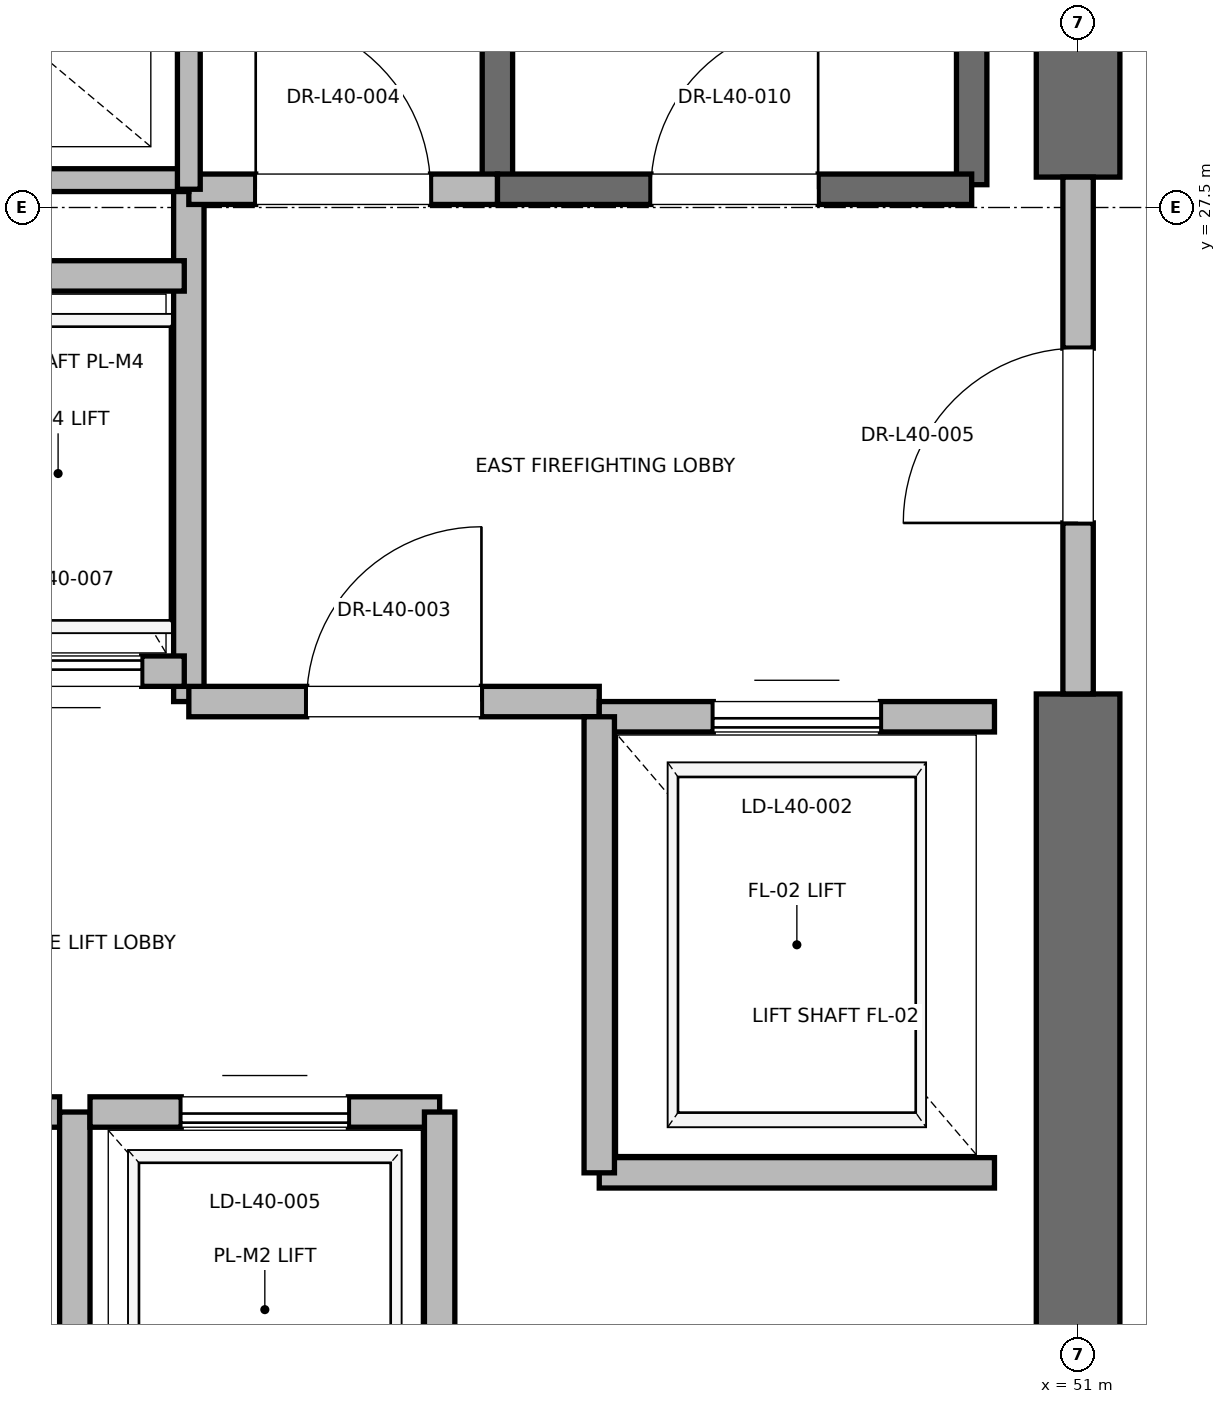
"""IFC4 building model, lengths in metres.
Left out: names, types, materials, properties, quantities, classifications, styles, units other than length and angle.
Written with IfcOpenShell. Run it as: python <this file> out.ifc"""

import sys

from ifc_helpers import new_model, si_unit, direction, frame, frame_2d, origin, place, context, subcontext, project, spatial, rectangle, extrude, element, fill, save


model = new_model("IFC4")
c1 = context("Model", 3, precision=1e-05, world=origin(), true_north=direction((0.0, 1.0)))
c2 = subcontext(c1, "Body", "Model", "MODEL_VIEW")
j1 = project(units=[si_unit("LENGTHUNIT", "METRE"), si_unit("PLANEANGLEUNIT", "RADIAN")], contexts=[c1])
p1 = place(None, origin())
s1 = spatial("IfcSite", under=j1, at=p1, CompositionType="ELEMENT")
p2 = place(p1, origin())
s2 = spatial("IfcBuilding", under=s1, at=p2, CompositionType="ELEMENT")
p3 = place(p2, frame((0.0, 0.0, 172.4)))
s3 = spatial("IfcBuildingStorey", under=s2, at=p3, CompositionType="ELEMENT", Elevation=172.4)
p4 = place(p3, frame((51.0, 18.5, 0.0), z_axis=(0.0, 0.0, 1.0), x_axis=(0.0, 1.0, 0.0)))
e1 = element("IfcWall", 1, at=p4, inside=s3, PredefinedType="SHEAR", context=c2, shape_type="SweptSolid", body=[
    extrude(rectangle(XDim=5.8, YDim=0.55, at=frame_2d((2.9, 0.0))), origin(), (0.0, 0.0, 1.0), 3.775),
])
p5 = place(p3, frame((51.0, 27.7, 0.0), z_axis=(0.0, 0.0, 1.0), x_axis=(0.0, 1.0, 0.0)))
e2 = element("IfcWall", 2, at=p5, inside=s3, PredefinedType="SHEAR", context=c2, shape_type="SweptSolid", body=[
    extrude(rectangle(XDim=8.8, YDim=0.55, at=frame_2d((4.4, 0.0))), origin(), (0.0, 0.0, 1.0), 3.775),
])
p6 = place(p3, frame((50.3, 27.65, 0.0), z_axis=(0.0, 0.0, 1.0), x_axis=(0.0, 1.0, 0.0)))
e3 = element("IfcWall", 3, at=p6, inside=s3, PredefinedType="SOLIDWALL", context=c2, shape_type="SweptSolid", body=[
    extrude(rectangle(XDim=8.15, YDim=0.2, at=frame_2d((4.075, 0.0))), origin(), (0.0, 0.0, 1.0), 3.775),
])
p7 = place(p3, frame((47.18, 27.62, 0.0), z_axis=(0.0, 0.0, 1.0), x_axis=(0.0, 1.0, 0.0)))
e4 = element("IfcWall", 4, at=p7, inside=s3, PredefinedType="SOLIDWALL", context=c2, shape_type="SweptSolid", body=[
    extrude(rectangle(XDim=8.18, YDim=0.2, at=frame_2d((4.09, 0.0))), origin(), (0.0, 0.0, 1.0), 3.775),
])
p8 = place(p3, frame((47.18, 27.62, 0.0), z_axis=(0.0, 0.0, 1.0), x_axis=(1.0, 0.0, 0.0)))
e5 = element("IfcWall", 5, at=p8, inside=s3, PredefinedType="SOLIDWALL", context=c2, shape_type="SweptSolid", body=[
    extrude(rectangle(XDim=3.12, YDim=0.2, at=frame_2d((1.56, 0.0))), origin(), (0.0, 0.0, 1.0), 3.775),
])
p9 = place(p8, frame((1.01, 0.0, 0.0)))
e6 = element("IfcOpeningElement", 6, at=p9, cuts=e5, PredefinedType="OPENING", context=c2, shape_type="SweptSolid", body=[
    extrude(rectangle(XDim=1.1, YDim=2.15, at=frame_2d((0.55, 1.075))), frame((0.0, 0.1, 0.0), z_axis=(0.0, -1.0, 0.0), x_axis=(1.0, 0.0, 0.0)), (0.0, 0.0, 1.0), 0.2),
])
p10 = place(p3, frame((45.15, 24.25, 0.0), z_axis=(0.0, 0.0, 1.0), x_axis=(0.0, 1.0, 0.0)))
e7 = element("IfcWall", 7, at=p10, inside=s3, PredefinedType="PARTITIONING", context=c2, shape_type="SweptSolid", body=[
    extrude(rectangle(XDim=3.37, YDim=0.2, at=frame_2d((1.685, 0.0))), origin(), (0.0, 0.0, 1.0), 3.775),
])
p11 = place(p3, frame((45.15, 24.25, 0.0), z_axis=(0.0, 0.0, 1.0), x_axis=(1.0, 0.0, 0.0)))
e8 = element("IfcWall", 8, at=p11, inside=s3, PredefinedType="PARTITIONING", context=c2, shape_type="SweptSolid", body=[
    extrude(rectangle(XDim=2.7, YDim=0.2, at=frame_2d((1.35, 0.0))), origin(), (0.0, 0.0, 1.0), 3.775),
])
p12 = place(p11, frame((0.775, 0.0, 0.0)))
e9 = element("IfcOpeningElement", 9, at=p12, cuts=e8, PredefinedType="OPENING", context=c2, shape_type="SweptSolid", body=[
    extrude(rectangle(XDim=1.15, YDim=2.2, at=frame_2d((0.575, 1.1))), frame((0.0, 0.1, 0.0), z_axis=(0.0, -1.0, 0.0), x_axis=(1.0, 0.0, 0.0)), (0.0, 0.0, 1.0), 0.2),
])
p13 = place(p3, frame((45.15, 27.62, 0.0), z_axis=(0.0, 0.0, 1.0), x_axis=(1.0, 0.0, 0.0)))
e10 = element("IfcWall", 10, at=p13, inside=s3, PredefinedType="PARTITIONING", context=c2, shape_type="SweptSolid", body=[
    extrude(rectangle(XDim=2.03, YDim=0.2, at=frame_2d((1.015, 0.0))), origin(), (0.0, 0.0, 1.0), 3.775),
])
p14 = place(p13, frame((0.44, 0.0, 0.0)))
e11 = element("IfcOpeningElement", 11, at=p14, cuts=e10, PredefinedType="OPENING", context=c2, shape_type="SweptSolid", body=[
    extrude(rectangle(XDim=1.15, YDim=2.2, at=frame_2d((0.575, 1.1))), frame((0.0, 0.1, 0.0), z_axis=(0.0, -1.0, 0.0), x_axis=(1.0, 0.0, 0.0)), (0.0, 0.0, 1.0), 0.2),
])
p15 = place(p3, frame((51.0, 24.3, 0.0), z_axis=(0.0, 0.0, 1.0), x_axis=(0.0, 1.0, 0.0)))
e12 = element("IfcWall", 12, at=p15, inside=s3, PredefinedType="PARTITIONING", context=c2, shape_type="SweptSolid", body=[
    extrude(rectangle(XDim=3.4, YDim=0.2, at=frame_2d((1.7, 0.0))), origin(), (0.0, 0.0, 1.0), 2.755),
])
p16 = place(p15, frame((1.125, 0.0, 0.0)))
e13 = element("IfcOpeningElement", 13, at=p16, cuts=e12, PredefinedType="OPENING", context=c2, shape_type="SweptSolid", body=[
    extrude(rectangle(XDim=1.15, YDim=2.2, at=frame_2d((0.575, 1.1))), frame((0.0, 0.1, 0.0), z_axis=(0.0, -1.0, 0.0), x_axis=(1.0, 0.0, 0.0)), (0.0, 0.0, 1.0), 0.2),
])
p17 = place(p3, frame((47.85, 21.15, 0.0), z_axis=(0.0, 0.0, 1.0), x_axis=(1.0, 0.0, 0.0)))
e14 = element("IfcWall", 14, at=p17, inside=s3, PredefinedType="SOLIDWALL", context=c2, shape_type="SweptSolid", body=[
    extrude(rectangle(XDim=2.6, YDim=0.2, at=frame_2d((1.3, 0.0))), origin(), (0.0, 0.0, 1.0), 3.775),
])
p18 = place(p3, frame((50.45, 24.15, 0.0), z_axis=(0.0, 0.0, 1.0), x_axis=(-1.0, 0.0, 0.0)))
e15 = element("IfcWall", 15, at=p18, inside=s3, PredefinedType="SOLIDWALL", context=c2, shape_type="SweptSolid", body=[
    extrude(rectangle(XDim=2.6, YDim=0.2, at=frame_2d((1.3, 0.0))), origin(), (0.0, 0.0, 1.0), 2.755),
])
p19 = place(p18, frame((0.75, 0.0, 0.0)))
e16 = element("IfcOpeningElement", 16, at=p19, cuts=e15, PredefinedType="OPENING", context=c2, shape_type="SweptSolid", body=[
    extrude(rectangle(XDim=1.1, YDim=2.2, at=frame_2d((0.55, 1.1))), frame((0.0, 0.1, 0.0), z_axis=(0.0, -1.0, 0.0), x_axis=(1.0, 0.0, 0.0)), (0.0, 0.0, 1.0), 0.2),
])
p20 = place(p3, frame((47.85, 24.15, 0.0), z_axis=(0.0, 0.0, 1.0), x_axis=(0.0, -1.0, 0.0)))
e17 = element("IfcWall", 17, at=p20, inside=s3, PredefinedType="SOLIDWALL", context=c2, shape_type="SweptSolid", body=[
    extrude(rectangle(XDim=3.0, YDim=0.2, at=frame_2d((1.5, 0.0))), origin(), (0.0, 0.0, 1.0), 3.775),
])
p21 = place(p3, frame((44.3, 21.55, 0.0), z_axis=(0.0, 0.0, 1.0), x_axis=(-1.0, 0.0, 0.0)))
e18 = element("IfcWall", 18, at=p21, inside=s3, PredefinedType="SOLIDWALL", context=c2, shape_type="SweptSolid", body=[
    extrude(rectangle(XDim=2.3, YDim=0.2, at=frame_2d((1.15, 0.0))), origin(), (0.0, 0.0, 1.0), 3.775),
])
p22 = place(p21, frame((0.6, 0.0, 0.0)))
e19 = element("IfcOpeningElement", 19, at=p22, cuts=e18, PredefinedType="OPENING", context=c2, shape_type="SweptSolid", body=[
    extrude(rectangle(XDim=1.1, YDim=2.2, at=frame_2d((0.55, 1.1))), frame((0.0, 0.1, 0.0), z_axis=(0.0, -1.0, 0.0), x_axis=(1.0, 0.0, 0.0)), (0.0, 0.0, 1.0), 0.2),
])
p23 = place(p3, frame((44.4, 18.95, 0.0), z_axis=(0.0, 0.0, 1.0), x_axis=(0.0, 1.0, 0.0)))
e20 = element("IfcWall", 20, at=p23, inside=s3, PredefinedType="SOLIDWALL", context=c2, shape_type="SweptSolid", body=[
    extrude(rectangle(XDim=2.6, YDim=0.2, at=frame_2d((1.3, 0.0))), origin(), (0.0, 0.0, 1.0), 3.775),
])
p24 = place(p3, frame((46.8, 21.55, 0.0), z_axis=(0.0, 0.0, 1.0), x_axis=(-1.0, 0.0, 0.0)))
e21 = element("IfcWall", 21, at=p24, inside=s3, PredefinedType="SOLIDWALL", context=c2, shape_type="SweptSolid", body=[
    extrude(rectangle(XDim=2.3, YDim=0.2, at=frame_2d((1.15, 0.0))), origin(), (0.0, 0.0, 1.0), 3.775),
])
p25 = place(p24, frame((0.6, 0.0, 0.0)))
e22 = element("IfcOpeningElement", 22, at=p25, cuts=e21, PredefinedType="OPENING", context=c2, shape_type="SweptSolid", body=[
    extrude(rectangle(XDim=1.1, YDim=2.2, at=frame_2d((0.55, 1.1))), frame((0.0, 0.1, 0.0), z_axis=(0.0, -1.0, 0.0), x_axis=(1.0, 0.0, 0.0)), (0.0, 0.0, 1.0), 0.2),
])
p26 = place(p3, frame((46.8, 18.95, 0.0), z_axis=(0.0, 0.0, 1.0), x_axis=(0.0, 1.0, 0.0)))
e23 = element("IfcWall", 23, at=p26, inside=s3, PredefinedType="SOLIDWALL", context=c2, shape_type="SweptSolid", body=[
    extrude(rectangle(XDim=2.6, YDim=0.2, at=frame_2d((1.3, 0.0))), origin(), (0.0, 0.0, 1.0), 3.775),
])
p27 = place(p3, frame((43.46, 24.45, 0.0), z_axis=(0.0, 0.0, 1.0), x_axis=(1.0, 0.0, 0.0)))
e24 = element("IfcWall", 24, at=p27, inside=s3, PredefinedType="SOLIDWALL", context=c2, shape_type="SweptSolid", body=[
    extrude(rectangle(XDim=1.66, YDim=0.2, at=frame_2d((0.83, 0.0))), origin(), (0.0, 0.0, 1.0), 3.775),
])
p28 = place(p27, frame((0.28, 0.0, 0.0)))
e25 = element("IfcOpeningElement", 25, at=p28, cuts=e24, PredefinedType="OPENING", context=c2, shape_type="SweptSolid", body=[
    extrude(rectangle(XDim=1.1, YDim=2.2, at=frame_2d((0.55, 1.1))), frame((0.0, 0.1, 0.0), z_axis=(0.0, -1.0, 0.0), x_axis=(1.0, 0.0, 0.0)), (0.0, 0.0, 1.0), 0.2),
])
p29 = place(p3, frame((45.12, 27.05, 0.0), z_axis=(0.0, 0.0, 1.0), x_axis=(-1.0, 0.0, 0.0)))
e26 = element("IfcWall", 26, at=p29, inside=s3, PredefinedType="SOLIDWALL", context=c2, shape_type="SweptSolid", body=[
    extrude(rectangle(XDim=1.66, YDim=0.2, at=frame_2d((0.83, 0.0))), origin(), (0.0, 0.0, 1.0), 3.775),
])
p30 = place(p3, frame((41.56, 27.68, 0.0), z_axis=(0.0, 0.0, 1.0), x_axis=(1.0, 0.0, 0.0)))
e27 = element("IfcWall", 27, at=p30, inside=s3, PredefinedType="PARTITIONING", context=c2, shape_type="SweptSolid", body=[
    extrude(rectangle(XDim=3.59, YDim=0.15, at=frame_2d((1.795, 0.0))), origin(), (0.0, 0.0, 1.0), 2.85),
])
p31 = place(p3, frame((45.15, 27.62, 0.0), z_axis=(0.0, 0.0, 1.0), x_axis=(0.0, 1.0, 0.0)))
e28 = element("IfcWall", 28, at=p31, inside=s3, PredefinedType="PARTITIONING", context=c2, shape_type="SweptSolid", body=[
    extrude(rectangle(XDim=3.1, YDim=0.15, at=frame_2d((1.55, 0.0))), origin(), (0.0, 0.0, 1.0), 2.85),
])
p32 = place(p9, origin())
e29 = element("IfcDoor", 29, at=p32, inside=s3, OperationType="SINGLE_SWING_RIGHT", PredefinedType="DOOR", context=c2, shape_type="SweptSolid", body=[
    extrude(rectangle(XDim=1.1, YDim=2.15, at=frame_2d((0.55, 1.075))), frame((0.0, 0.025, 0.0), z_axis=(0.0, -1.0, 0.0), x_axis=(1.0, 0.0, 0.0)), (0.0, 0.0, 1.0), 0.05),
])
fill(e6, e29)
p33 = place(p12, origin())
e30 = element("IfcDoor", 30, at=p33, inside=s3, OperationType="SINGLE_SWING_RIGHT", PredefinedType="DOOR", context=c2, shape_type="SweptSolid", body=[
    extrude(rectangle(XDim=1.15, YDim=2.2, at=frame_2d((0.575, 1.1))), frame((0.0, 0.025, 0.0), z_axis=(0.0, -1.0, 0.0), x_axis=(1.0, 0.0, 0.0)), (0.0, 0.0, 1.0), 0.05),
])
fill(e9, e30)
p34 = place(p14, origin())
e31 = element("IfcDoor", 31, at=p34, inside=s3, OperationType="SINGLE_SWING_LEFT", PredefinedType="DOOR", context=c2, shape_type="SweptSolid", body=[
    extrude(rectangle(XDim=1.15, YDim=2.2, at=frame_2d((0.575, 1.1))), frame((0.0, 0.025, 0.0), z_axis=(0.0, -1.0, 0.0), x_axis=(1.0, 0.0, 0.0)), (0.0, 0.0, 1.0), 0.05),
])
fill(e11, e31)
p35 = place(p16, origin())
e32 = element("IfcDoor", 32, at=p35, inside=s3, OperationType="SINGLE_SWING_LEFT", PredefinedType="DOOR", context=c2, shape_type="SweptSolid", body=[
    extrude(rectangle(XDim=1.15, YDim=2.2, at=frame_2d((0.575, 1.1))), frame((0.0, 0.025, 0.0), z_axis=(0.0, -1.0, 0.0), x_axis=(1.0, 0.0, 0.0)), (0.0, 0.0, 1.0), 0.05),
])
fill(e13, e32)
p36 = place(p19, origin())
e33 = element("IfcDoor", 33, at=p36, inside=s3, OperationType="SLIDING_TO_RIGHT", PredefinedType="DOOR", context=c2, shape_type="SweptSolid", body=[
    extrude(rectangle(XDim=1.1, YDim=2.2, at=frame_2d((0.55, 1.1))), frame((0.0, 0.025, 0.0), z_axis=(0.0, -1.0, 0.0), x_axis=(1.0, 0.0, 0.0)), (0.0, 0.0, 1.0), 0.05),
])
fill(e16, e33)
p37 = place(p25, origin())
e34 = element("IfcDoor", 34, at=p37, inside=s3, OperationType="SLIDING_TO_RIGHT", PredefinedType="DOOR", context=c2, shape_type="SweptSolid", body=[
    extrude(rectangle(XDim=1.1, YDim=2.2, at=frame_2d((0.55, 1.1))), frame((0.0, 0.025, 0.0), z_axis=(0.0, -1.0, 0.0), x_axis=(1.0, 0.0, 0.0)), (0.0, 0.0, 1.0), 0.05),
])
fill(e22, e34)
p38 = place(p28, origin())
e35 = element("IfcDoor", 35, at=p38, inside=s3, OperationType="SLIDING_TO_RIGHT", PredefinedType="DOOR", context=c2, shape_type="SweptSolid", body=[
    extrude(rectangle(XDim=1.1, YDim=2.2, at=frame_2d((0.55, 1.1))), frame((0.0, 0.025, 0.0), z_axis=(0.0, -1.0, 0.0), x_axis=(1.0, 0.0, 0.0)), (0.0, 0.0, 1.0), 0.05),
])
fill(e25, e35)
save(model, sys.argv[1])
